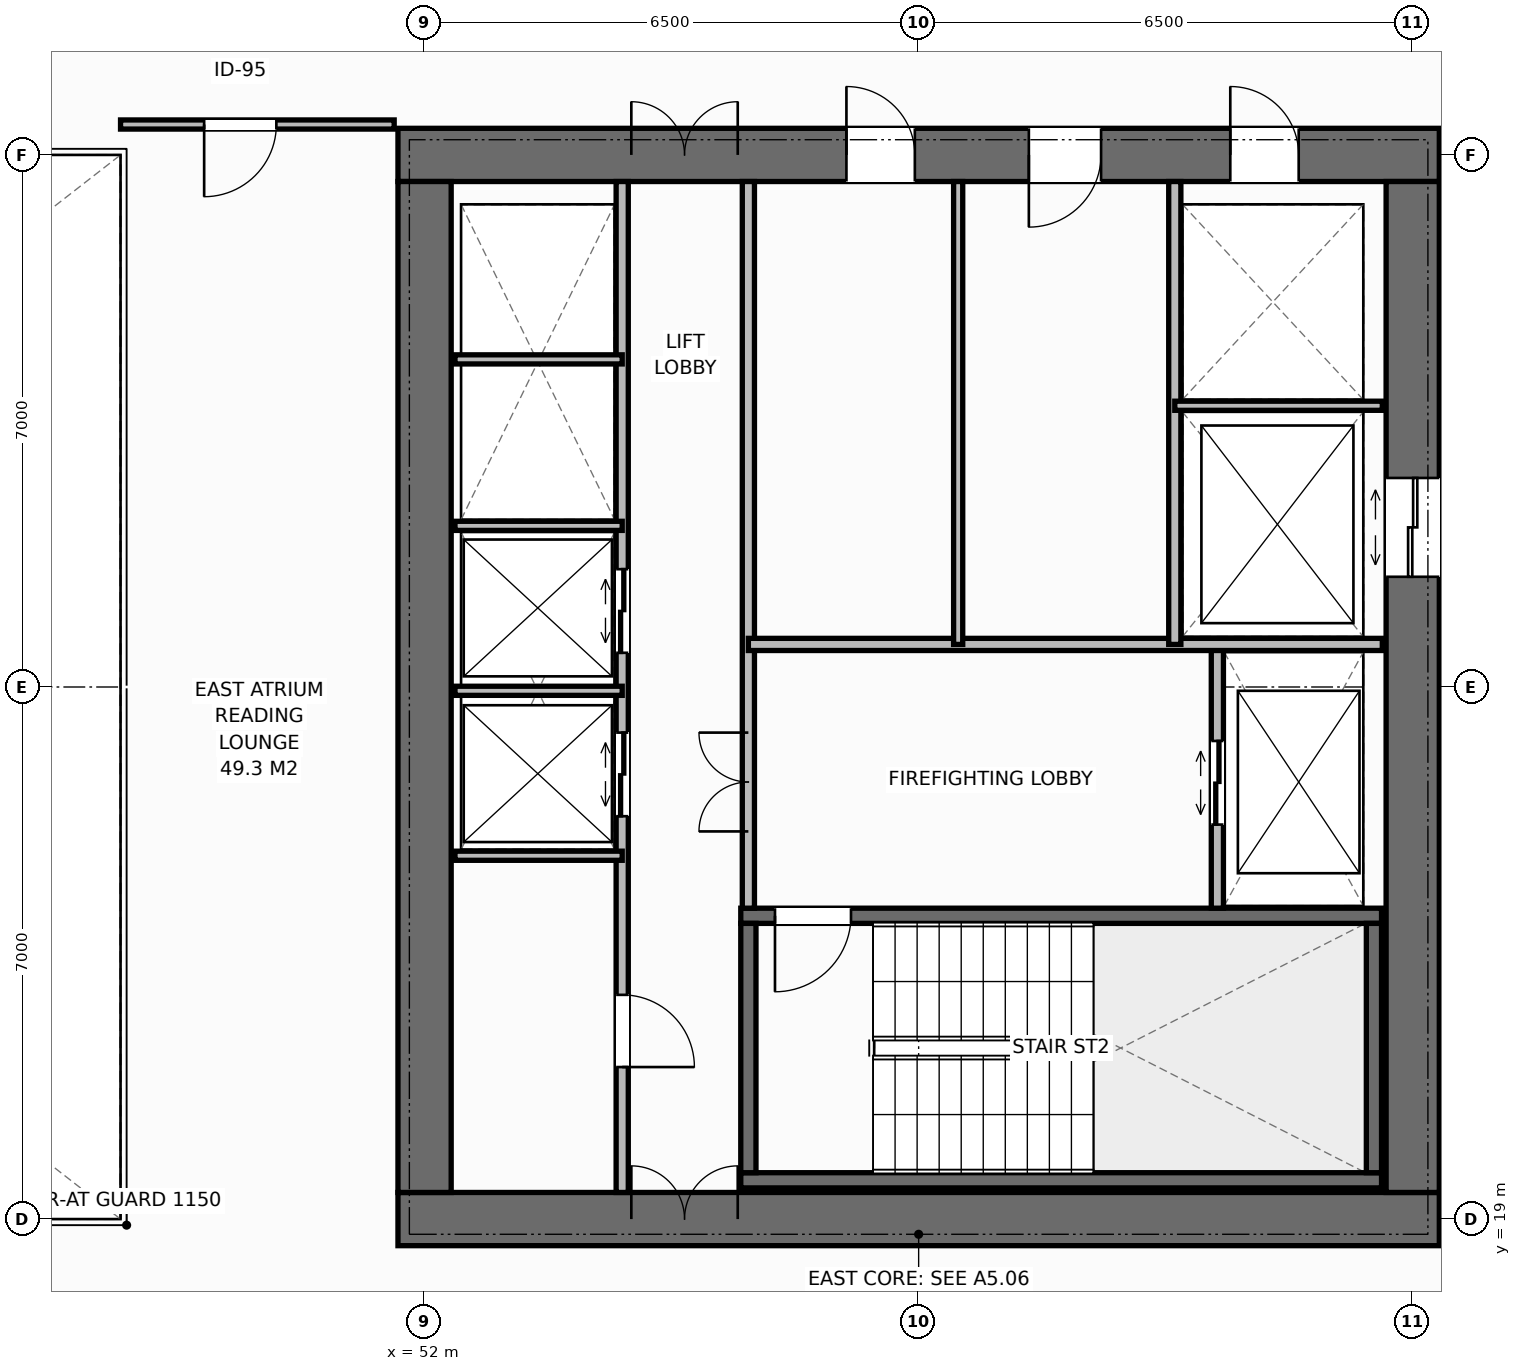
"""IFC4 building model, lengths in metres.
Left out: names, types, materials, properties, quantities, classifications, styles, units other than length and angle.
Written with IfcOpenShell. Run it as: python <this file> out.ifc"""

import sys

from ifc_helpers import new_model, si_unit, direction, frame, frame_2d, origin, place, context, subcontext, project, spatial, rectangle, extrude, element, fill, save


model = new_model("IFC4")
c1 = context("Model", 3, precision=1e-05, world=origin(), true_north=direction((0.0, 1.0)))
c2 = subcontext(c1, "Body", "Model", "MODEL_VIEW")
j1 = project(units=[si_unit("LENGTHUNIT", "METRE"), si_unit("PLANEANGLEUNIT", "RADIAN")], contexts=[c1])
p1 = place(None, origin())
s1 = spatial("IfcSite", under=j1, at=p1, CompositionType="ELEMENT")
p2 = place(p1, origin())
s2 = spatial("IfcBuilding", under=s1, at=p2, CompositionType="ELEMENT")
p3 = place(p2, frame((0.0, 0.0, 135.4)))
s3 = spatial("IfcBuildingStorey", under=s2, at=p3, CompositionType="ELEMENT", Elevation=135.4)
p4 = place(p3, frame((51.65, 19.0, 0.0), z_axis=(0.0, 0.0, 1.0), x_axis=(1.0, 0.0, 0.0)))
e1 = element("IfcWall", 1, at=p4, inside=s3, PredefinedType="SHEAR", context=c2, shape_type="SweptSolid", body=[
    extrude(rectangle(XDim=13.7, YDim=0.7, at=frame_2d((6.85, 0.0))), origin(), (0.0, 0.0, 1.0), 3.8),
])
p5 = place(p4, frame((3.07, 0.0, 0.0)))
e2 = element("IfcOpeningElement", 2, at=p5, cuts=e1, PredefinedType="OPENING", context=c2, shape_type="SweptSolid", body=[
    extrude(rectangle(XDim=1.4, YDim=2.2, at=frame_2d((0.7, 1.1))), frame((0.0, 0.36, 0.0), z_axis=(0.0, -1.0, 0.0), x_axis=(1.0, 0.0, 0.0)), (0.0, 0.0, 1.0), 0.72),
])
p6 = place(p3, frame((51.65, 33.0, 0.0), z_axis=(0.0, 0.0, 1.0), x_axis=(1.0, 0.0, 0.0)))
e3 = element("IfcWall", 3, at=p6, inside=s3, PredefinedType="SHEAR", context=c2, shape_type="SweptSolid", body=[
    extrude(rectangle(XDim=13.7, YDim=0.7, at=frame_2d((6.85, 0.0))), origin(), (0.0, 0.0, 1.0), 3.8),
])
p7 = place(p6, frame((3.07, 0.0, 0.0)))
e4 = element("IfcOpeningElement", 4, at=p7, cuts=e3, PredefinedType="OPENING", context=c2, shape_type="SweptSolid", body=[
    extrude(rectangle(XDim=1.4, YDim=2.2, at=frame_2d((0.7, 1.1))), frame((0.0, 0.36, 0.0), z_axis=(0.0, -1.0, 0.0), x_axis=(1.0, 0.0, 0.0)), (0.0, 0.0, 1.0), 0.72),
])
p8 = place(p6, frame((10.95, 0.0, 0.0)))
e5 = element("IfcOpeningElement", 5, at=p8, cuts=e3, PredefinedType="OPENING", context=c2, shape_type="SweptSolid", body=[
    extrude(rectangle(XDim=0.9, YDim=2.15, at=frame_2d((0.45, 1.075))), frame((0.0, 0.36, 0.0), z_axis=(0.0, -1.0, 0.0), x_axis=(1.0, 0.0, 0.0)), (0.0, 0.0, 1.0), 0.72),
])
p9 = place(p6, frame((5.9, 0.0, 0.0)))
e6 = element("IfcOpeningElement", 6, at=p9, cuts=e3, PredefinedType="OPENING", context=c2, shape_type="SweptSolid", body=[
    extrude(rectangle(XDim=0.9, YDim=2.15, at=frame_2d((0.45, 1.075))), frame((0.0, 0.36, 0.0), z_axis=(0.0, -1.0, 0.0), x_axis=(1.0, 0.0, 0.0)), (0.0, 0.0, 1.0), 0.72),
])
p10 = place(p6, frame((8.3, 0.0, 0.0)))
e7 = element("IfcOpeningElement", 7, at=p10, cuts=e3, PredefinedType="OPENING", context=c2, shape_type="SweptSolid", body=[
    extrude(rectangle(XDim=0.95, YDim=2.15, at=frame_2d((0.475, 1.075))), frame((0.0, 0.36, 0.0), z_axis=(0.0, -1.0, 0.0), x_axis=(1.0, 0.0, 0.0)), (0.0, 0.0, 1.0), 0.72),
])
p11 = place(p3, frame((52.0, 19.35, 0.0), z_axis=(0.0, 0.0, 1.0), x_axis=(0.0, 1.0, 0.0)))
e8 = element("IfcWall", 8, at=p11, inside=s3, PredefinedType="SHEAR", context=c2, shape_type="SweptSolid", body=[
    extrude(rectangle(XDim=13.3, YDim=0.7, at=frame_2d((6.65, 0.0))), origin(), (0.0, 0.0, 1.0), 3.8),
])
p12 = place(p3, frame((65.0, 19.35, 0.0), z_axis=(0.0, 0.0, 1.0), x_axis=(0.0, 1.0, 0.0)))
e9 = element("IfcWall", 9, at=p12, inside=s3, PredefinedType="SHEAR", context=c2, shape_type="SweptSolid", body=[
    extrude(rectangle(XDim=13.3, YDim=0.7, at=frame_2d((6.65, 0.0))), origin(), (0.0, 0.0, 1.0), 3.8),
])
p13 = place(p12, frame((8.1, 0.0, 0.0)))
e10 = element("IfcOpeningElement", 10, at=p13, cuts=e9, PredefinedType="OPENING", context=c2, shape_type="SweptSolid", body=[
    extrude(rectangle(XDim=1.3, YDim=2.2, at=frame_2d((0.65, 1.1))), frame((0.0, 0.36, 0.0), z_axis=(0.0, -1.0, 0.0), x_axis=(1.0, 0.0, 0.0)), (0.0, 0.0, 1.0), 0.72),
])
p14 = place(p3, frame((56.16, 19.51, 0.0), z_axis=(0.0, 0.0, 1.0), x_axis=(1.0, 0.0, 0.0)))
e11 = element("IfcWall", 11, at=p14, inside=s3, PredefinedType="SHEAR", context=c2, shape_type="SweptSolid", body=[
    extrude(rectangle(XDim=8.43, YDim=0.2, at=frame_2d((4.215, 0.0))), origin(), (0.0, 0.0, 1.0), 3.8),
])
p15 = place(p3, frame((56.16, 22.99, 0.0), z_axis=(0.0, 0.0, 1.0), x_axis=(1.0, 0.0, 0.0)))
e12 = element("IfcWall", 12, at=p15, inside=s3, PredefinedType="SHEAR", context=c2, shape_type="SweptSolid", body=[
    extrude(rectangle(XDim=8.43, YDim=0.2, at=frame_2d((4.215, 0.0))), origin(), (0.0, 0.0, 1.0), 3.8),
])
p16 = place(p15, frame((0.45, 0.0, 0.0)))
e13 = element("IfcOpeningElement", 13, at=p16, cuts=e12, PredefinedType="OPENING", context=c2, shape_type="SweptSolid", body=[
    extrude(rectangle(XDim=1.0, YDim=2.15, at=frame_2d((0.5, 1.075))), frame((0.0, 0.11, 0.0), z_axis=(0.0, -1.0, 0.0), x_axis=(1.0, 0.0, 0.0)), (0.0, 0.0, 1.0), 0.22),
])
for number, where, z_axis, x_axis in (
    (14, (56.26, 19.61, 0.0), (0.0, 0.0, 1.0), (0.0, 1.0, 0.0)),
    (15, (64.49, 19.61, 0.0), (0.0, 0.0, 1.0), (0.0, 1.0, 0.0)),
):
    element("IfcWall", number, at=place(p3, frame(where, z_axis=z_axis, x_axis=x_axis)), inside=s3, PredefinedType="SHEAR", context=c2, shape_type="SweptSolid", body=[
        extrude(rectangle(XDim=3.28, YDim=0.2, at=frame_2d((1.64, 0.0))), origin(), (0.0, 0.0, 1.0), 3.8),
    ])
p17 = place(p3, frame((54.6, 19.35, 0.0), z_axis=(0.0, 0.0, 1.0), x_axis=(0.0, 1.0, 0.0)))
e16 = element("IfcWall", 16, at=p17, inside=s3, PredefinedType="STANDARD", context=c2, shape_type="SweptSolid", body=[
    extrude(rectangle(XDim=13.3, YDim=0.16, at=frame_2d((6.65, 0.0))), origin(), (0.0, 0.0, 1.0), 3.52),
])
p18 = place(p17, frame((1.65, 0.0, 0.0)))
e17 = element("IfcOpeningElement", 17, at=p18, cuts=e16, PredefinedType="OPENING", context=c2, shape_type="SweptSolid", body=[
    extrude(rectangle(XDim=0.95, YDim=2.15, at=frame_2d((0.475, 1.075))), frame((0.0, 0.09, 0.0), z_axis=(0.0, -1.0, 0.0), x_axis=(1.0, 0.0, 0.0)), (0.0, 0.0, 1.0), 0.18),
])
p19 = place(p17, frame((4.95, 0.0, 0.0)))
e18 = element("IfcOpeningElement", 18, at=p19, cuts=e16, PredefinedType="OPENING", context=c2, shape_type="SweptSolid", body=[
    extrude(rectangle(XDim=1.1, YDim=2.2, at=frame_2d((0.55, 1.1))), frame((0.0, 0.09, 0.0), z_axis=(0.0, -1.0, 0.0), x_axis=(1.0, 0.0, 0.0)), (0.0, 0.0, 1.0), 0.18),
])
p20 = place(p17, frame((7.1, 0.0, 0.0)))
e19 = element("IfcOpeningElement", 19, at=p20, cuts=e16, PredefinedType="OPENING", context=c2, shape_type="SweptSolid", body=[
    extrude(rectangle(XDim=1.1, YDim=2.2, at=frame_2d((0.55, 1.1))), frame((0.0, 0.09, 0.0), z_axis=(0.0, -1.0, 0.0), x_axis=(1.0, 0.0, 0.0)), (0.0, 0.0, 1.0), 0.18),
])
p21 = place(p3, frame((56.26, 23.09, 0.0), z_axis=(0.0, 0.0, 1.0), x_axis=(0.0, 1.0, 0.0)))
e20 = element("IfcWall", 20, at=p21, inside=s3, PredefinedType="STANDARD", context=c2, shape_type="SweptSolid", body=[
    extrude(rectangle(XDim=9.56, YDim=0.16, at=frame_2d((4.78, 0.0))), origin(), (0.0, 0.0, 1.0), 3.52),
])
p22 = place(p21, frame((1.01, 0.0, 0.0)))
e21 = element("IfcOpeningElement", 21, at=p22, cuts=e20, PredefinedType="OPENING", context=c2, shape_type="SweptSolid", body=[
    extrude(rectangle(XDim=1.3, YDim=2.2, at=frame_2d((0.65, 1.1))), frame((0.0, 0.09, 0.0), z_axis=(0.0, -1.0, 0.0), x_axis=(1.0, 0.0, 0.0)), (0.0, 0.0, 1.0), 0.18),
])
for number, where, z_axis, x_axis in (
    (22, (52.4, 23.78, 0.0), (0.0, 0.0, 1.0), (1.0, 0.0, 0.0)),
    (23, (52.4, 25.95, 0.0), (0.0, 0.0, 1.0), (1.0, 0.0, 0.0)),
    (24, (52.4, 28.12, 0.0), (0.0, 0.0, 1.0), (1.0, 0.0, 0.0)),
    (25, (52.4, 30.31, 0.0), (0.0, 0.0, 1.0), (1.0, 0.0, 0.0)),
):
    element("IfcWall", number, at=place(p3, frame(where, z_axis=z_axis, x_axis=x_axis)), inside=s3, PredefinedType="PARTITIONING", context=c2, shape_type="SweptSolid", body=[
        extrude(rectangle(XDim=2.2, YDim=0.12, at=frame_2d((1.1, 0.0))), origin(), (0.0, 0.0, 1.0), 3.52),
    ])
p23 = place(p3, frame((62.43, 23.09, 0.0), z_axis=(0.0, 0.0, 1.0), x_axis=(0.0, 1.0, 0.0)))
e26 = element("IfcWall", 26, at=p23, inside=s3, PredefinedType="STANDARD", context=c2, shape_type="SweptSolid", body=[
    extrude(rectangle(XDim=3.47, YDim=0.16, at=frame_2d((1.735, 0.0))), origin(), (0.0, 0.0, 1.0), 3.52),
])
p24 = place(p23, frame((1.1, 0.0, 0.0)))
e27 = element("IfcOpeningElement", 27, at=p24, cuts=e26, PredefinedType="OPENING", context=c2, shape_type="SweptSolid", body=[
    extrude(rectangle(XDim=1.1, YDim=2.2, at=frame_2d((0.55, 1.1))), frame((0.0, 0.09, 0.0), z_axis=(0.0, -1.0, 0.0), x_axis=(1.0, 0.0, 0.0)), (0.0, 0.0, 1.0), 0.18),
])
p25 = place(p3, frame((56.26, 26.56, 0.0), z_axis=(0.0, 0.0, 1.0), x_axis=(1.0, 0.0, 0.0)))
e28 = element("IfcWall", 28, at=p25, inside=s3, PredefinedType="STANDARD", context=c2, shape_type="SweptSolid", body=[
    extrude(rectangle(XDim=8.34, YDim=0.16, at=frame_2d((4.17, 0.0))), origin(), (0.0, 0.0, 1.0), 3.52),
])
p26 = place(p3, frame((61.87, 26.56, 0.0), z_axis=(0.0, 0.0, 1.0), x_axis=(0.0, 1.0, 0.0)))
e29 = element("IfcWall", 29, at=p26, inside=s3, PredefinedType="STANDARD", context=c2, shape_type="SweptSolid", body=[
    extrude(rectangle(XDim=6.09, YDim=0.16, at=frame_2d((3.045, 0.0))), origin(), (0.0, 0.0, 1.0), 3.52),
])
p27 = place(p3, frame((61.87, 29.7, 0.0), z_axis=(0.0, 0.0, 1.0), x_axis=(1.0, 0.0, 0.0)))
e30 = element("IfcWall", 30, at=p27, inside=s3, PredefinedType="PARTITIONING", context=c2, shape_type="SweptSolid", body=[
    extrude(rectangle(XDim=2.73, YDim=0.12, at=frame_2d((1.365, 0.0))), origin(), (0.0, 0.0, 1.0), 3.52),
])
p28 = place(p3, frame((59.02, 26.56, 0.0), z_axis=(0.0, 0.0, 1.0), x_axis=(0.0, 1.0, 0.0)))
e31 = element("IfcWall", 31, at=p28, inside=s3, PredefinedType="PARTITIONING", context=c2, shape_type="SweptSolid", body=[
    extrude(rectangle(XDim=6.09, YDim=0.12, at=frame_2d((3.045, 0.0))), origin(), (0.0, 0.0, 1.0), 3.52),
])
p29 = place(p3, frame((48.0, 33.4, 0.0), z_axis=(0.0, 0.0, 1.0), x_axis=(1.0, 0.0, 0.0)))
e32 = element("IfcWall", 32, at=p29, inside=s3, PredefinedType="PARTITIONING", context=c2, shape_type="SweptSolid", body=[
    extrude(rectangle(XDim=3.6, YDim=0.12, at=frame_2d((1.8, 0.0))), origin(), (0.0, 0.0, 1.0), 3.52),
])
p30 = place(p29, frame((1.1, 0.0, 0.0)))
e33 = element("IfcOpeningElement", 33, at=p30, cuts=e32, PredefinedType="OPENING", context=c2, shape_type="SweptSolid", body=[
    extrude(rectangle(XDim=0.95, YDim=2.15, at=frame_2d((0.475, 1.075))), frame((0.0, 0.07, 0.0), z_axis=(0.0, -1.0, 0.0), x_axis=(1.0, 0.0, 0.0)), (0.0, 0.0, 1.0), 0.14),
])
p31 = place(p5, origin())
e34 = element("IfcDoor", 34, at=p31, inside=s3, OperationType="DOUBLE_DOOR_SINGLE_SWING", PredefinedType="DOOR", context=c2, shape_type="SweptSolid", body=[
    extrude(rectangle(XDim=1.4, YDim=2.2, at=frame_2d((0.7, 1.1))), frame((0.0, 0.125, 0.0), z_axis=(0.0, -1.0, 0.0), x_axis=(1.0, 0.0, 0.0)), (0.0, 0.0, 1.0), 0.05),
])
fill(e2, e34)
p32 = place(p7, origin())
e35 = element("IfcDoor", 35, at=p32, inside=s3, OperationType="DOUBLE_DOOR_SINGLE_SWING", PredefinedType="DOOR", context=c2, shape_type="SweptSolid", body=[
    extrude(rectangle(XDim=1.4, YDim=2.2, at=frame_2d((0.7, 1.1))), frame((0.0, -0.075, 0.0), z_axis=(0.0, -1.0, 0.0), x_axis=(1.0, 0.0, 0.0)), (0.0, 0.0, 1.0), 0.05),
])
fill(e4, e35)
p33 = place(p18, origin())
e36 = element("IfcDoor", 36, at=p33, inside=s3, OperationType="SINGLE_SWING_RIGHT", PredefinedType="DOOR", context=c2, shape_type="SweptSolid", body=[
    extrude(rectangle(XDim=0.95, YDim=2.15, at=frame_2d((0.475, 1.075))), frame((0.0, 0.025, 0.0), z_axis=(0.0, -1.0, 0.0), x_axis=(1.0, 0.0, 0.0)), (0.0, 0.0, 1.0), 0.05),
])
fill(e17, e36)
p34 = place(p19, origin())
e37 = element("IfcDoor", 37, at=p34, inside=s3, OperationType="DOUBLE_DOOR_SLIDING", PredefinedType="DOOR", context=c2, shape_type="SweptSolid", body=[
    extrude(rectangle(XDim=1.1, YDim=2.2, at=frame_2d((0.55, 1.1))), frame((0.0, 0.025, 0.0), z_axis=(0.0, -1.0, 0.0), x_axis=(1.0, 0.0, 0.0)), (0.0, 0.0, 1.0), 0.05),
])
fill(e18, e37)
p35 = place(p20, origin())
e38 = element("IfcDoor", 38, at=p35, inside=s3, OperationType="DOUBLE_DOOR_SLIDING", PredefinedType="DOOR", context=c2, shape_type="SweptSolid", body=[
    extrude(rectangle(XDim=1.1, YDim=2.2, at=frame_2d((0.55, 1.1))), frame((0.0, 0.025, 0.0), z_axis=(0.0, -1.0, 0.0), x_axis=(1.0, 0.0, 0.0)), (0.0, 0.0, 1.0), 0.05),
])
fill(e19, e38)
p36 = place(p16, origin())
e39 = element("IfcDoor", 39, at=p36, inside=s3, OperationType="SINGLE_SWING_RIGHT", PredefinedType="DOOR", context=c2, shape_type="SweptSolid", body=[
    extrude(rectangle(XDim=1.0, YDim=2.15, at=frame_2d((0.5, 1.075))), frame((0.0, 0.025, 0.0), z_axis=(0.0, -1.0, 0.0), x_axis=(1.0, 0.0, 0.0)), (0.0, 0.0, 1.0), 0.05),
])
fill(e13, e39)
p37 = place(p24, origin())
e40 = element("IfcDoor", 40, at=p37, inside=s3, OperationType="DOUBLE_DOOR_SLIDING", PredefinedType="DOOR", context=c2, shape_type="SweptSolid", body=[
    extrude(rectangle(XDim=1.1, YDim=2.2, at=frame_2d((0.55, 1.1))), frame((0.0, 0.025, 0.0), z_axis=(0.0, -1.0, 0.0), x_axis=(1.0, 0.0, 0.0)), (0.0, 0.0, 1.0), 0.05),
])
fill(e27, e40)
p38 = place(p22, origin())
e41 = element("IfcDoor", 41, at=p38, inside=s3, OperationType="DOUBLE_DOOR_SINGLE_SWING", PredefinedType="DOOR", context=c2, shape_type="SweptSolid", body=[
    extrude(rectangle(XDim=1.3, YDim=2.2, at=frame_2d((0.65, 1.1))), frame((0.0, 0.025, 0.0), z_axis=(0.0, -1.0, 0.0), x_axis=(1.0, 0.0, 0.0)), (0.0, 0.0, 1.0), 0.05),
])
fill(e21, e41)
p39 = place(p13, origin())
e42 = element("IfcDoor", 42, at=p39, inside=s3, OperationType="DOUBLE_DOOR_SLIDING", PredefinedType="DOOR", context=c2, shape_type="SweptSolid", body=[
    extrude(rectangle(XDim=1.3, YDim=2.2, at=frame_2d((0.65, 1.1))), frame((0.0, 0.025, 0.0), z_axis=(0.0, -1.0, 0.0), x_axis=(1.0, 0.0, 0.0)), (0.0, 0.0, 1.0), 0.05),
])
fill(e10, e42)
p40 = place(p8, origin())
e43 = element("IfcDoor", 43, at=p40, inside=s3, OperationType="SINGLE_SWING_LEFT", PredefinedType="DOOR", context=c2, shape_type="SweptSolid", body=[
    extrude(rectangle(XDim=0.9, YDim=2.15, at=frame_2d((0.45, 1.075))), frame((0.0, -0.075, 0.0), z_axis=(0.0, -1.0, 0.0), x_axis=(1.0, 0.0, 0.0)), (0.0, 0.0, 1.0), 0.05),
])
fill(e5, e43)
p41 = place(p9, origin())
e44 = element("IfcDoor", 44, at=p41, inside=s3, OperationType="SINGLE_SWING_LEFT", PredefinedType="DOOR", context=c2, shape_type="SweptSolid", body=[
    extrude(rectangle(XDim=0.9, YDim=2.15, at=frame_2d((0.45, 1.075))), frame((0.0, -0.075, 0.0), z_axis=(0.0, -1.0, 0.0), x_axis=(1.0, 0.0, 0.0)), (0.0, 0.0, 1.0), 0.05),
])
fill(e6, e44)
p42 = place(p10, origin())
e45 = element("IfcDoor", 45, at=p42, inside=s3, OperationType="SINGLE_SWING_RIGHT", PredefinedType="DOOR", context=c2, shape_type="SweptSolid", body=[
    extrude(rectangle(XDim=0.95, YDim=2.15, at=frame_2d((0.475, 1.075))), frame((0.0, -0.075, 0.0), z_axis=(0.0, -1.0, 0.0), x_axis=(1.0, 0.0, 0.0)), (0.0, 0.0, 1.0), 0.05),
])
fill(e7, e45)
p43 = place(p30, origin())
e46 = element("IfcDoor", 46, at=p43, inside=s3, OperationType="SINGLE_SWING_RIGHT", PredefinedType="DOOR", context=c2, shape_type="SweptSolid", body=[
    extrude(rectangle(XDim=0.95, YDim=2.15, at=frame_2d((0.475, 1.075))), frame((0.0, 0.025, 0.0), z_axis=(0.0, -1.0, 0.0), x_axis=(1.0, 0.0, 0.0)), (0.0, 0.0, 1.0), 0.05),
])
fill(e33, e46)
save(model, sys.argv[1])
